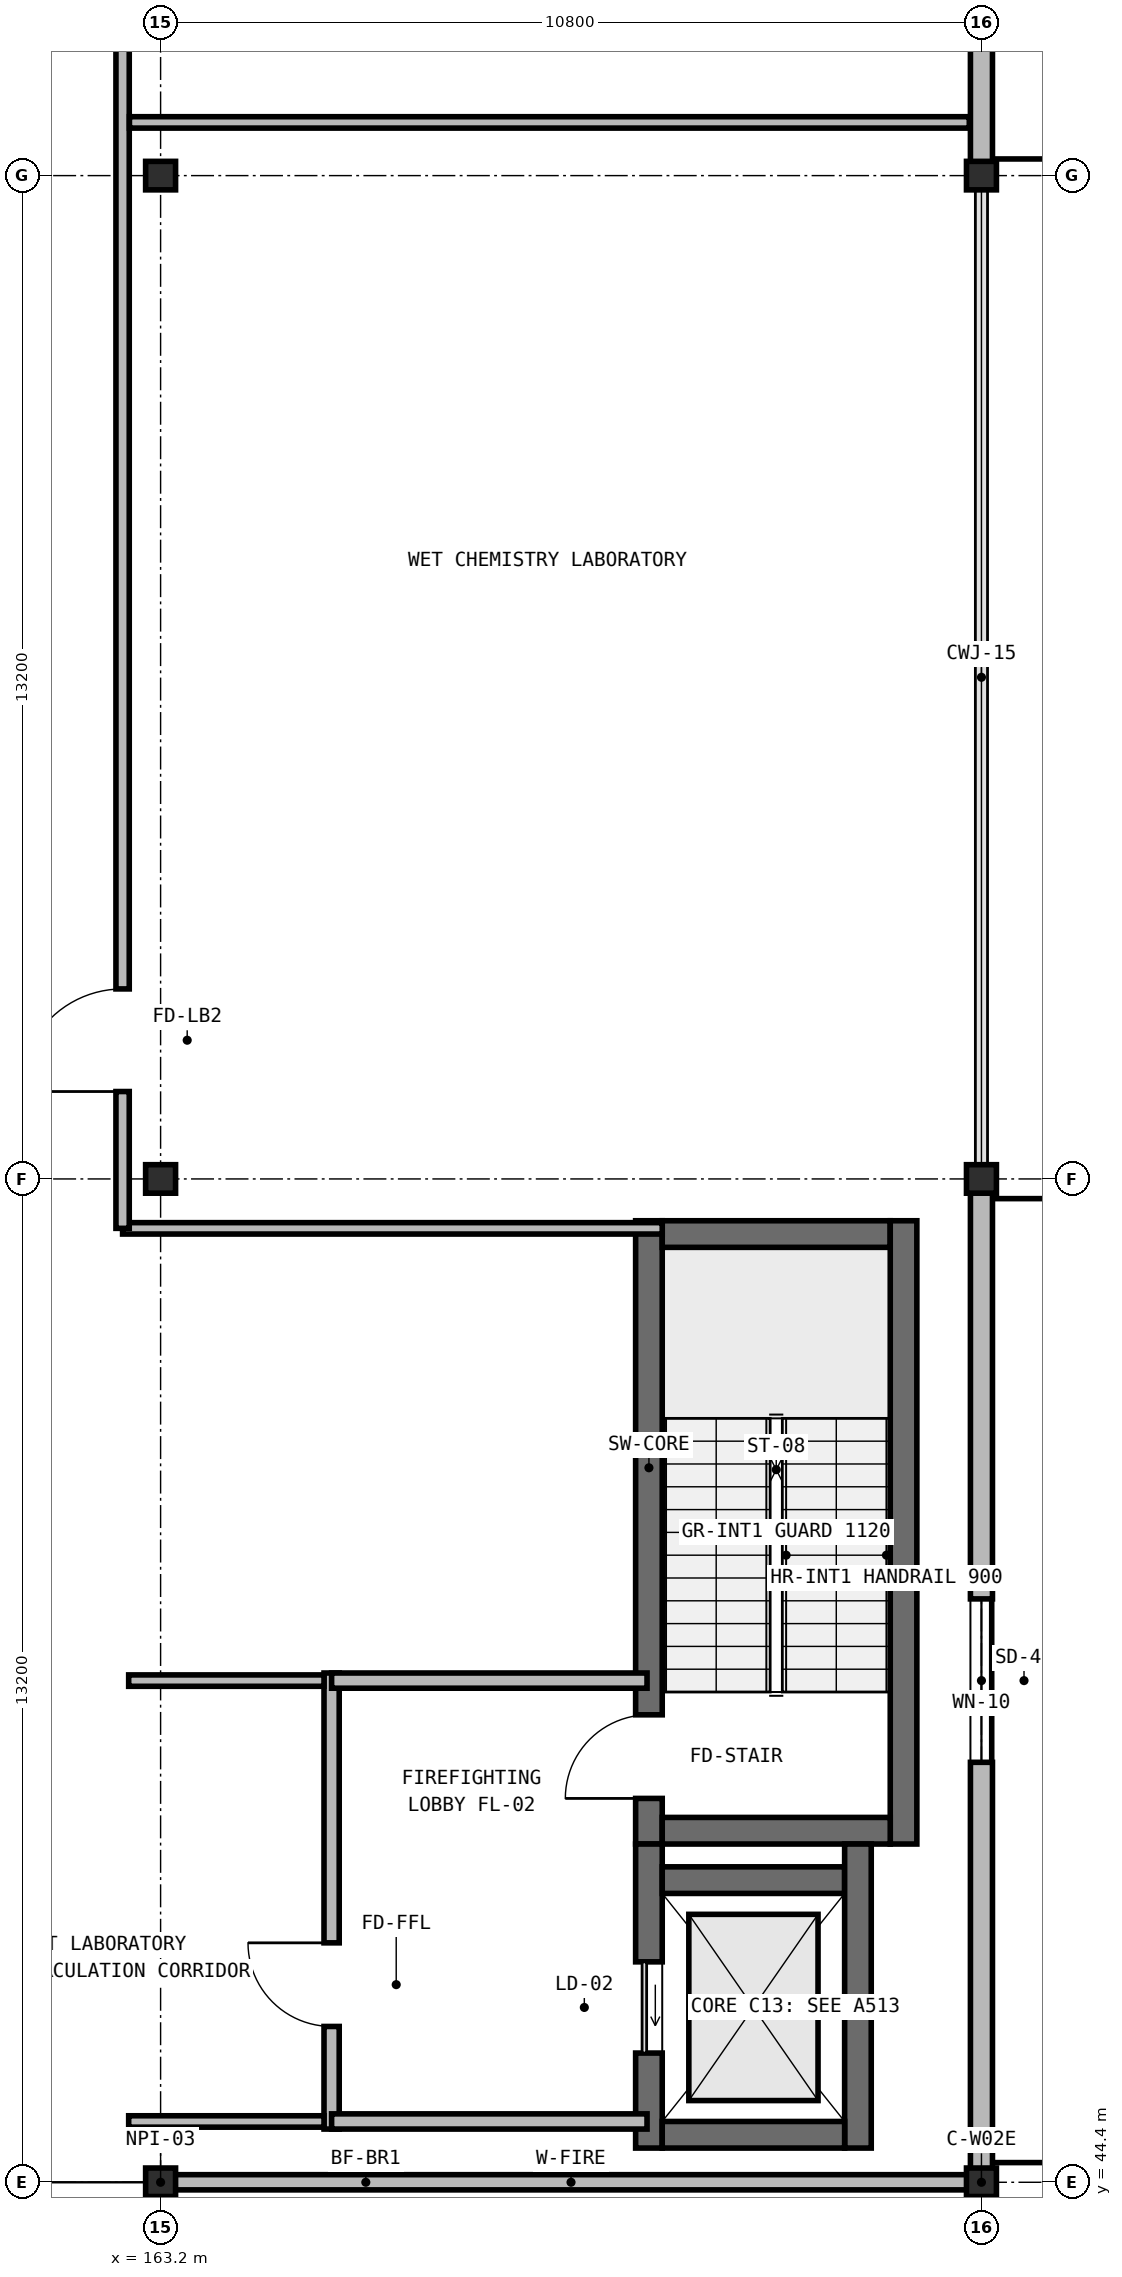
"""IFC4 building model, lengths in metres.
Left out: names, types, materials, properties, quantities, classifications, styles, units other than length and angle.
Written with IfcOpenShell. Run it as: python <this file> out.ifc"""

import sys

from ifc_helpers import new_model, si_unit, direction, frame, frame_2d, origin, origin_2d, place, context, subcontext, project, spatial, rectangle, i_section, extrude, element, fill, save


model = new_model("IFC4")
c1 = context("Model", 3, precision=1e-05, world=origin(), true_north=direction((0.0, 1.0)))
c2 = subcontext(c1, "Body", "Model", "MODEL_VIEW")
j1 = project(units=[si_unit("LENGTHUNIT", "METRE"), si_unit("PLANEANGLEUNIT", "RADIAN")], contexts=[c1])
p1 = place(None, origin())
s1 = spatial("IfcSite", under=j1, at=p1, CompositionType="ELEMENT")
p2 = place(p1, origin())
s2 = spatial("IfcBuilding", under=s1, at=p2, CompositionType="ELEMENT")
p3 = place(p2, frame((0.0, 0.0, 9.8)))
s3 = spatial("IfcBuildingStorey", under=s2, at=p3, CompositionType="ELEMENT", Elevation=9.8)
p4 = place(p3, frame((169.625, 48.85, 0.0), z_axis=(0.0, 0.0, 1.0), x_axis=(0.0, 1.0, 0.0)))
e1 = element("IfcWall", 1, at=p4, inside=s3, PredefinedType="SHEAR", context=c2, shape_type="SweptSolid", body=[
    extrude(rectangle(XDim=8.2, YDim=0.35, at=frame_2d((4.1, 0.0))), origin(), (0.0, 0.0, 1.0), 4.55),
])
p5 = place(p4, frame((0.6, 0.0, 0.0)))
e2 = element("IfcOpeningElement", 2, at=p5, cuts=e1, PredefinedType="OPENING", context=c2, shape_type="SweptSolid", body=[
    extrude(rectangle(XDim=1.1, YDim=2.15, at=frame_2d((0.55, 1.075))), frame((0.0, 0.185, 0.0), z_axis=(0.0, -1.0, 0.0), x_axis=(1.0, 0.0, 0.0)), (0.0, 0.0, 1.0), 0.37),
])
p6 = place(p3, frame((169.8, 56.875, 0.0), z_axis=(0.0, 0.0, 1.0), x_axis=(1.0, 0.0, 0.0)))
e3 = element("IfcWall", 3, at=p6, inside=s3, PredefinedType="SHEAR", context=c2, shape_type="SweptSolid", body=[
    extrude(rectangle(XDim=3.0, YDim=0.35, at=frame_2d((1.5, 0.0))), origin(), (0.0, 0.0, 1.0), 4.55),
])
p7 = place(p3, frame((172.975, 57.05, 0.0), z_axis=(0.0, 0.0, 1.0), x_axis=(0.0, -1.0, 0.0)))
e4 = element("IfcWall", 4, at=p7, inside=s3, PredefinedType="SHEAR", context=c2, shape_type="SweptSolid", body=[
    extrude(rectangle(XDim=8.2, YDim=0.35, at=frame_2d((4.1, 0.0))), origin(), (0.0, 0.0, 1.0), 4.55),
])
p8 = place(p3, frame((172.8, 49.025, 0.0), z_axis=(0.0, 0.0, 1.0), x_axis=(-1.0, 0.0, 0.0)))
e5 = element("IfcWall", 5, at=p8, inside=s3, PredefinedType="SHEAR", context=c2, shape_type="SweptSolid", body=[
    extrude(rectangle(XDim=3.0, YDim=0.35, at=frame_2d((1.5, 0.0))), origin(), (0.0, 0.0, 1.0), 4.55),
])
p9 = place(p3, frame((169.625, 44.85, 0.0), z_axis=(0.0, 0.0, 1.0), x_axis=(0.0, 1.0, 0.0)))
e6 = element("IfcWall", 6, at=p9, inside=s3, PredefinedType="SHEAR", context=c2, shape_type="SweptSolid", body=[
    extrude(rectangle(XDim=4.0, YDim=0.35, at=frame_2d((2.0, 0.0))), origin(), (0.0, 0.0, 1.0), 4.55),
])
p10 = place(p9, frame((1.25, 0.0, 0.0)))
e7 = element("IfcOpeningElement", 7, at=p10, cuts=e6, PredefinedType="OPENING", context=c2, shape_type="SweptSolid", body=[
    extrude(rectangle(XDim=1.2, YDim=2.15, at=frame_2d((0.6, 1.075))), frame((0.0, 0.185, 0.0), z_axis=(0.0, -1.0, 0.0), x_axis=(1.0, 0.0, 0.0)), (0.0, 0.0, 1.0), 0.37),
])
p11 = place(p3, frame((169.8, 48.375, 0.0), z_axis=(0.0, 0.0, 1.0), x_axis=(1.0, 0.0, 0.0)))
e8 = element("IfcWall", 8, at=p11, inside=s3, PredefinedType="SHEAR", context=c2, shape_type="SweptSolid", body=[
    extrude(rectangle(XDim=2.4, YDim=0.35, at=frame_2d((1.2, 0.0))), origin(), (0.0, 0.0, 1.0), 4.55),
])
p12 = place(p3, frame((172.375, 48.85, 0.0), z_axis=(0.0, 0.0, 1.0), x_axis=(0.0, -1.0, 0.0)))
e9 = element("IfcWall", 9, at=p12, inside=s3, PredefinedType="SHEAR", context=c2, shape_type="SweptSolid", body=[
    extrude(rectangle(XDim=4.0, YDim=0.35, at=frame_2d((2.0, 0.0))), origin(), (0.0, 0.0, 1.0), 4.55),
])
p13 = place(p3, frame((172.2, 45.025, 0.0), z_axis=(0.0, 0.0, 1.0), x_axis=(-1.0, 0.0, 0.0)))
e10 = element("IfcWall", 10, at=p13, inside=s3, PredefinedType="SHEAR", context=c2, shape_type="SweptSolid", body=[
    extrude(rectangle(XDim=2.4, YDim=0.35, at=frame_2d((1.2, 0.0))), origin(), (0.0, 0.0, 1.0), 4.55),
])
for number, where, z_axis, x_axis in (
    (11, (163.2, 44.4, 0.0), (0.0, 0.0, 1.0), (1.0, 0.0, 0.0)),
    (12, (163.2, 57.6, 0.0), (0.0, 0.0, 1.0), (1.0, 0.0, 0.0)),
    (13, (163.2, 70.8, 0.0), (0.0, 0.0, 1.0), (1.0, 0.0, 0.0)),
    (14, (174.0, 44.4, 0.0), (0.0, 0.0, 1.0), (1.0, 0.0, 0.0)),
    (15, (174.0, 57.6, 0.0), (0.0, 0.0, 1.0), (1.0, 0.0, 0.0)),
    (16, (174.0, 70.8, 0.0), (0.0, 0.0, 1.0), (1.0, 0.0, 0.0)),
):
    element("IfcColumn", number, at=place(p3, frame(where, z_axis=z_axis, x_axis=x_axis)), inside=s3, PredefinedType="COLUMN", context=c2, shape_type="SweptSolid", body=[
        extrude(i_section(OverallWidth=0.394, OverallDepth=0.375, WebThickness=0.02, FlangeThickness=0.032, at=origin_2d()), origin(), (0.0, 0.0, 1.0), 4.55),
    ])
p14 = place(p3, frame((174.0, 83.996, 0.0), z_axis=(0.0, 0.0, 1.0), x_axis=(0.0, -1.0, 0.0)))
e17 = element("IfcWall", 17, at=p14, inside=s3, PredefinedType="SOLIDWALL", context=c2, shape_type="SweptSolid", body=[
    extrude(rectangle(XDim=13.192, YDim=0.29, at=frame_2d((6.596, 0.0))), origin(), (0.0, 0.0, 1.0), 3.814),
])
p15 = place(p14, frame((5.686, 0.0, 0.95)))
e18 = element("IfcOpeningElement", 18, at=p15, cuts=e17, PredefinedType="OPENING", context=c2, shape_type="SweptSolid", body=[
    extrude(rectangle(XDim=1.82, YDim=1.4, at=frame_2d((0.91, 0.7))), frame((0.0, 0.155, 0.0), z_axis=(0.0, -1.0, 0.0), x_axis=(1.0, 0.0, 0.0)), (0.0, 0.0, 1.0), 0.31),
])
p16 = place(p3, frame((174.0, 57.596, 0.0), z_axis=(0.0, 0.0, 1.0), x_axis=(0.0, -1.0, 0.0)))
e19 = element("IfcWall", 19, at=p16, inside=s3, PredefinedType="SOLIDWALL", context=c2, shape_type="SweptSolid", body=[
    extrude(rectangle(XDim=13.192, YDim=0.29, at=frame_2d((6.596, 0.0))), origin(), (0.0, 0.0, 1.0), 3.814),
])
p17 = place(p16, frame((5.521, 0.0, 0.95)))
e20 = element("IfcOpeningElement", 20, at=p17, cuts=e19, PredefinedType="OPENING", context=c2, shape_type="SweptSolid", body=[
    extrude(rectangle(XDim=2.15, YDim=1.8, at=frame_2d((1.075, 0.9))), frame((0.0, 0.155, 0.0), z_axis=(0.0, -1.0, 0.0), x_axis=(1.0, 0.0, 0.0)), (0.0, 0.0, 1.0), 0.31),
])
p18 = place(p3, frame((174.0, 44.396, 0.0), z_axis=(0.0, 0.0, 1.0), x_axis=(0.0, -1.0, 0.0)))
e21 = element("IfcWall", 21, at=p18, inside=s3, PredefinedType="SOLIDWALL", context=c2, shape_type="SweptSolid", body=[
    extrude(rectangle(XDim=9.592, YDim=0.29, at=frame_2d((4.796, 0.0))), origin(), (0.0, 0.0, 1.0), 3.884),
])
p19 = place(p18, frame((3.556, 0.0, 0.95)))
e22 = element("IfcOpeningElement", 22, at=p19, cuts=e21, PredefinedType="OPENING", context=c2, shape_type="SweptSolid", body=[
    extrude(rectangle(XDim=2.48, YDim=1.72, at=frame_2d((1.24, 0.86))), frame((0.0, 0.155, 0.0), z_axis=(0.0, -1.0, 0.0), x_axis=(1.0, 0.0, 0.0)), (0.0, 0.0, 1.0), 0.31),
])
p20 = place(p3, frame((163.36, 44.4, 0.0), z_axis=(0.0, 0.0, 1.0), x_axis=(1.0, 0.0, 0.0)))
e23 = element("IfcWall", 23, at=p20, inside=s3, PredefinedType="SOLIDWALL", context=c2, shape_type="SweptSolid", body=[
    extrude(rectangle(XDim=10.48, YDim=0.2, at=frame_2d((5.24, 0.0))), origin(), (0.0, 0.0, 1.0), 3.737),
])
p21 = place(p3, frame((165.45, 45.1, 0.0), z_axis=(0.0, 0.0, 1.0), x_axis=(0.0, 1.0, 0.0)))
e24 = element("IfcWall", 24, at=p21, inside=s3, PredefinedType="SOLIDWALL", context=c2, shape_type="SweptSolid", body=[
    extrude(rectangle(XDim=6.0, YDim=0.2, at=frame_2d((3.0, 0.0))), origin(), (0.0, 0.0, 1.0), 4.3),
])
p22 = place(p21, frame((1.35, 0.0, 0.0)))
e25 = element("IfcOpeningElement", 25, at=p22, cuts=e24, PredefinedType="OPENING", context=c2, shape_type="SweptSolid", body=[
    extrude(rectangle(XDim=1.1, YDim=2.15, at=frame_2d((0.55, 1.075))), frame((0.0, 0.11, 0.0), z_axis=(0.0, -1.0, 0.0), x_axis=(1.0, 0.0, 0.0)), (0.0, 0.0, 1.0), 0.22),
])
for number, where, z_axis, x_axis in (
    (26, (165.45, 45.2, 0.0), (0.0, 0.0, 1.0), (1.0, 0.0, 0.0)),
    (27, (165.45, 51.0, 0.0), (0.0, 0.0, 1.0), (1.0, 0.0, 0.0)),
):
    element("IfcWall", number, at=place(p3, frame(where, z_axis=z_axis, x_axis=x_axis)), inside=s3, PredefinedType="SOLIDWALL", context=c2, shape_type="SweptSolid", body=[
        extrude(rectangle(XDim=4.15, YDim=0.2, at=frame_2d((2.075, 0.0))), origin(), (0.0, 0.0, 1.0), 4.3),
    ])
p23 = place(p3, frame((162.7, 56.95, 0.0), z_axis=(0.0, 0.0, 1.0), x_axis=(1.0, 0.0, 0.0)))
e28 = element("IfcWall", 28, at=p23, inside=s3, PredefinedType="PARTITIONING", context=c2, shape_type="SweptSolid", body=[
    extrude(rectangle(XDim=7.1, YDim=0.15, at=frame_2d((3.55, 0.0))), origin(), (0.0, 0.0, 1.0), 4.3),
])
p24 = place(p3, frame((162.7, 56.95, 0.0), z_axis=(0.0, 0.0, 1.0), x_axis=(0.0, 1.0, 0.0)))
e29 = element("IfcWall", 29, at=p24, inside=s3, PredefinedType="PARTITIONING", context=c2, shape_type="SweptSolid", body=[
    extrude(rectangle(XDim=17.8, YDim=0.175, at=frame_2d((8.9, 0.0))), origin(), (0.0, 0.0, 1.0), 4.3),
])
p25 = place(p24, frame((1.8, 0.0, 0.0)))
e30 = element("IfcOpeningElement", 30, at=p25, cuts=e29, PredefinedType="OPENING", context=c2, shape_type="SweptSolid", body=[
    extrude(rectangle(XDim=1.35, YDim=2.2, at=frame_2d((0.675, 1.1))), frame((0.0, 0.097, 0.0), z_axis=(0.0, -1.0, 0.0), x_axis=(1.0, 0.0, 0.0)), (0.0, 0.0, 1.0), 0.195),
])
p26 = place(p24, frame((15.95, 0.0, 0.0)))
e31 = element("IfcOpeningElement", 31, at=p26, cuts=e29, PredefinedType="OPENING", context=c2, shape_type="SweptSolid", body=[
    extrude(rectangle(XDim=1.35, YDim=2.2, at=frame_2d((0.675, 1.1))), frame((0.0, 0.097, 0.0), z_axis=(0.0, -1.0, 0.0), x_axis=(1.0, 0.0, 0.0)), (0.0, 0.0, 1.0), 0.195),
])
p27 = place(p3, frame((162.79, 71.5, 0.0), z_axis=(0.0, 0.0, 1.0), x_axis=(1.0, 0.0, 0.0)))
e32 = element("IfcWall", 32, at=p27, inside=s3, PredefinedType="PARTITIONING", context=c2, shape_type="SweptSolid", body=[
    extrude(rectangle(XDim=11.05, YDim=0.15, at=frame_2d((5.525, 0.0))), origin(), (0.0, 0.0, 1.0), 4.3),
])
for number, where, z_axis, x_axis in (
    (33, (162.78, 45.2, 0.0), (0.0, 0.0, 1.0), (1.0, 0.0, 0.0)),
    (34, (162.78, 51.0, 0.0), (0.0, 0.0, 1.0), (1.0, 0.0, 0.0)),
):
    element("IfcWall", number, at=place(p3, frame(where, z_axis=z_axis, x_axis=x_axis)), inside=s3, PredefinedType="PARTITIONING", context=c2, shape_type="SweptSolid", body=[
        extrude(rectangle(XDim=2.57, YDim=0.15, at=frame_2d((1.285, 0.0))), origin(), (0.0, 0.0, 1.0), 4.3),
    ])
p28 = place(p17, origin())
e35 = element("IfcWindow", 35, at=p28, inside=s3, PartitioningType="SINGLE_PANEL", PredefinedType="WINDOW", context=c2, shape_type="SweptSolid", body=[
    extrude(rectangle(XDim=2.15, YDim=1.8, at=frame_2d((1.075, 0.9))), frame((0.0, 0.03, 0.0), z_axis=(0.0, -1.0, 0.0), x_axis=(1.0, 0.0, 0.0)), (0.0, 0.0, 1.0), 0.06),
])
fill(e20, e35)
p29 = place(p5, origin())
e36 = element("IfcDoor", 36, at=p29, inside=s3, OperationType="SINGLE_SWING_LEFT", PredefinedType="DOOR", context=c2, shape_type="SweptSolid", body=[
    extrude(rectangle(XDim=1.1, YDim=2.15, at=frame_2d((0.55, 1.075))), frame((0.0, 0.025, 0.0), z_axis=(0.0, -1.0, 0.0), x_axis=(1.0, 0.0, 0.0)), (0.0, 0.0, 1.0), 0.05),
])
fill(e2, e36)
p30 = place(p10, origin())
e37 = element("IfcDoor", 37, at=p30, inside=s3, OperationType="SLIDING_TO_LEFT", PredefinedType="USERDEFINED", context=c2, shape_type="SweptSolid", body=[
    extrude(rectangle(XDim=1.2, YDim=2.15, at=frame_2d((0.6, 1.075))), frame((0.0, 0.025, 0.0), z_axis=(0.0, -1.0, 0.0), x_axis=(1.0, 0.0, 0.0)), (0.0, 0.0, 1.0), 0.05),
])
fill(e7, e37)
p31 = place(p22, origin())
e38 = element("IfcDoor", 38, at=p31, inside=s3, OperationType="SINGLE_SWING_RIGHT", PredefinedType="DOOR", context=c2, shape_type="SweptSolid", body=[
    extrude(rectangle(XDim=1.1, YDim=2.15, at=frame_2d((0.55, 1.075))), frame((0.0, 0.025, 0.0), z_axis=(0.0, -1.0, 0.0), x_axis=(1.0, 0.0, 0.0)), (0.0, 0.0, 1.0), 0.05),
])
fill(e25, e38)
p32 = place(p25, origin())
e39 = element("IfcDoor", 39, at=p32, inside=s3, OperationType="SINGLE_SWING_LEFT", PredefinedType="DOOR", context=c2, shape_type="SweptSolid", body=[
    extrude(rectangle(XDim=1.35, YDim=2.2, at=frame_2d((0.675, 1.1))), frame((0.0, 0.025, 0.0), z_axis=(0.0, -1.0, 0.0), x_axis=(1.0, 0.0, 0.0)), (0.0, 0.0, 1.0), 0.05),
])
fill(e30, e39)
save(model, sys.argv[1])
